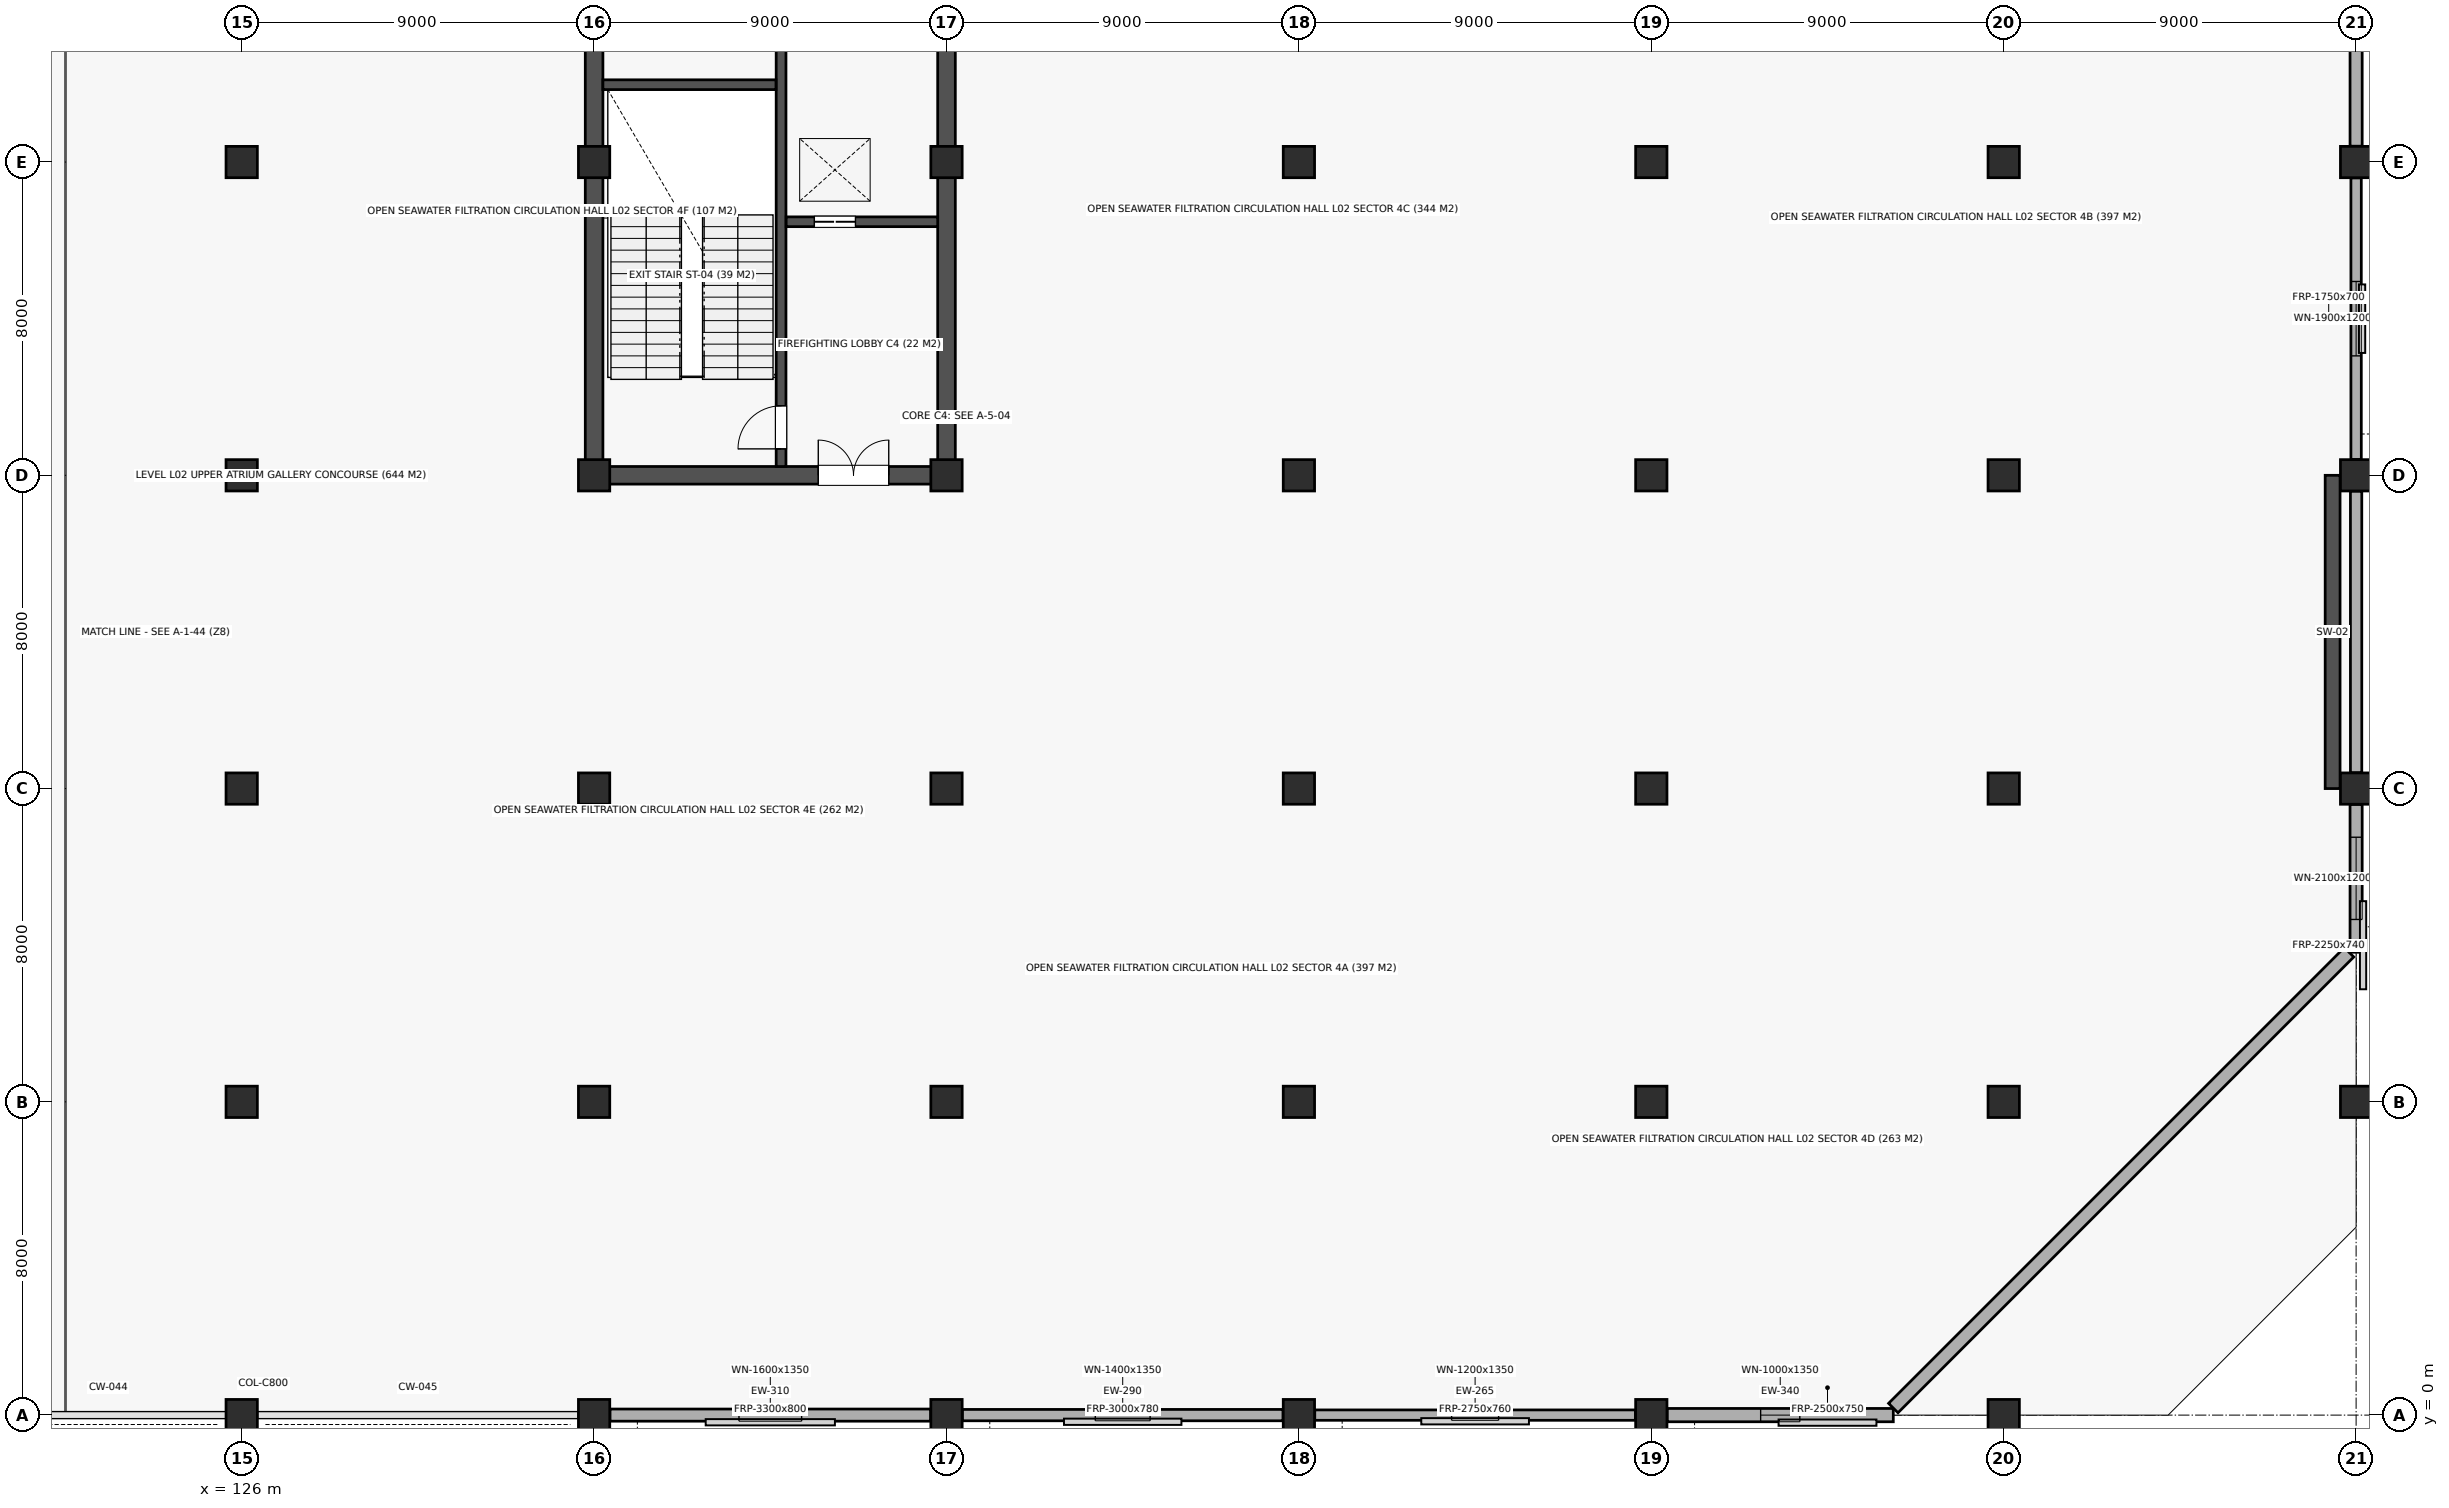
"""IFC4 building model, lengths in metres.
Left out: names, types, materials, properties, quantities, classifications, styles, units other than length and angle.
Written with IfcOpenShell. Run it as: python <this file> out.ifc"""

import sys

from ifc_helpers import new_model, si_unit, direction, frame, frame_2d, origin, origin_2d, place, context, subcontext, project, spatial, rectangle, extrude, element, fill, save


model = new_model("IFC4")
c1 = context("Model", 3, precision=1e-05, world=origin(), true_north=direction((0.0, 1.0)))
c2 = subcontext(c1, "Body", "Model", "MODEL_VIEW")
j1 = project(units=[si_unit("LENGTHUNIT", "METRE"), si_unit("PLANEANGLEUNIT", "RADIAN")], contexts=[c1])
p1 = place(None, origin())
s1 = spatial("IfcSite", under=j1, at=p1, CompositionType="ELEMENT")
p2 = place(p1, origin())
s2 = spatial("IfcBuilding", under=s1, at=p2, CompositionType="ELEMENT")
p3 = place(p2, frame((0.0, 0.0, 9.0)))
s3 = spatial("IfcBuildingStorey", under=s2, at=p3, CompositionType="ELEMENT", Elevation=9.0)
for number, where, z_axis, x_axis in (
    (1, (126.0, 0.0, 0.0), (0.0, 0.0, 1.0), (1.0, 0.0, 0.0)),
    (2, (126.0, 8.0, 0.0), (0.0, 0.0, 1.0), (1.0, 0.0, 0.0)),
    (3, (126.0, 16.0, 0.0), (0.0, 0.0, 1.0), (1.0, 0.0, 0.0)),
    (4, (126.0, 24.0, 0.0), (0.0, 0.0, 1.0), (1.0, 0.0, 0.0)),
    (5, (126.0, 32.0, 0.0), (0.0, 0.0, 1.0), (1.0, 0.0, 0.0)),
    (6, (135.0, 0.0, 0.0), (0.0, 0.0, 1.0), (1.0, 0.0, 0.0)),
    (7, (135.0, 8.0, 0.0), (0.0, 0.0, 1.0), (1.0, 0.0, 0.0)),
    (8, (135.0, 16.0, 0.0), (0.0, 0.0, 1.0), (1.0, 0.0, 0.0)),
    (9, (135.0, 24.0, 0.0), (0.0, 0.0, 1.0), (1.0, 0.0, 0.0)),
    (10, (135.0, 32.0, 0.0), (0.0, 0.0, 1.0), (1.0, 0.0, 0.0)),
    (11, (144.0, 0.0, 0.0), (0.0, 0.0, 1.0), (1.0, 0.0, 0.0)),
    (12, (144.0, 8.0, 0.0), (0.0, 0.0, 1.0), (1.0, 0.0, 0.0)),
    (13, (144.0, 16.0, 0.0), (0.0, 0.0, 1.0), (1.0, 0.0, 0.0)),
    (14, (144.0, 24.0, 0.0), (0.0, 0.0, 1.0), (1.0, 0.0, 0.0)),
    (15, (144.0, 32.0, 0.0), (0.0, 0.0, 1.0), (1.0, 0.0, 0.0)),
    (16, (153.0, 0.0, 0.0), (0.0, 0.0, 1.0), (1.0, 0.0, 0.0)),
    (17, (153.0, 8.0, 0.0), (0.0, 0.0, 1.0), (1.0, 0.0, 0.0)),
    (18, (153.0, 16.0, 0.0), (0.0, 0.0, 1.0), (1.0, 0.0, 0.0)),
    (19, (153.0, 24.0, 0.0), (0.0, 0.0, 1.0), (1.0, 0.0, 0.0)),
    (20, (153.0, 32.0, 0.0), (0.0, 0.0, 1.0), (1.0, 0.0, 0.0)),
    (21, (162.0, 0.0, 0.0), (0.0, 0.0, 1.0), (1.0, 0.0, 0.0)),
    (22, (162.0, 8.0, 0.0), (0.0, 0.0, 1.0), (1.0, 0.0, 0.0)),
    (23, (162.0, 16.0, 0.0), (0.0, 0.0, 1.0), (1.0, 0.0, 0.0)),
    (24, (162.0, 24.0, 0.0), (0.0, 0.0, 1.0), (1.0, 0.0, 0.0)),
    (25, (162.0, 32.0, 0.0), (0.0, 0.0, 1.0), (1.0, 0.0, 0.0)),
    (26, (171.0, 0.0, 0.0), (0.0, 0.0, 1.0), (1.0, 0.0, 0.0)),
    (27, (171.0, 8.0, 0.0), (0.0, 0.0, 1.0), (1.0, 0.0, 0.0)),
    (28, (171.0, 16.0, 0.0), (0.0, 0.0, 1.0), (1.0, 0.0, 0.0)),
    (29, (171.0, 24.0, 0.0), (0.0, 0.0, 1.0), (1.0, 0.0, 0.0)),
    (30, (171.0, 32.0, 0.0), (0.0, 0.0, 1.0), (1.0, 0.0, 0.0)),
    (31, (180.0, 8.0, 0.0), (0.0, 0.0, 1.0), (1.0, 0.0, 0.0)),
    (32, (180.0, 16.0, 0.0), (0.0, 0.0, 1.0), (1.0, 0.0, 0.0)),
    (33, (180.0, 24.0, 0.0), (0.0, 0.0, 1.0), (1.0, 0.0, 0.0)),
    (34, (180.0, 32.0, 0.0), (0.0, 0.0, 1.0), (1.0, 0.0, 0.0)),
):
    element("IfcColumn", number, at=place(p3, frame(where, z_axis=z_axis, x_axis=x_axis)), inside=s3, PredefinedType="COLUMN", context=c2, shape_type="SweptSolid", body=[
        extrude(rectangle(XDim=0.8, YDim=0.8, at=origin_2d()), origin(), (0.0, 0.0, 1.0), 4.5),
    ])
p4 = place(p3, frame((179.4, 16.0, 0.0), z_axis=(0.0, 0.0, 1.0), x_axis=(0.0, 1.0, 0.0)))
e35 = element("IfcWall", 35, at=p4, inside=s3, PredefinedType="SHEAR", context=c2, shape_type="SweptSolid", body=[
    extrude(rectangle(XDim=8.0, YDim=0.38, at=frame_2d((4.0, 0.0))), origin(), (0.0, 0.0, 1.0), 4.14),
])
p5 = place(p3, frame((135.225, 24.0, 0.0), z_axis=(0.0, 0.0, 1.0), x_axis=(1.0, 0.0, 0.0)))
e36 = element("IfcWall", 36, at=p5, inside=s3, PredefinedType="SHEAR", context=c2, shape_type="SweptSolid", body=[
    extrude(rectangle(XDim=8.55, YDim=0.45, at=frame_2d((4.275, 0.0))), origin(), (0.0, 0.0, 1.0), 4.14),
])
p6 = place(p5, frame((5.5, 0.0, 0.0)))
e37 = element("IfcOpeningElement", 37, at=p6, cuts=e36, PredefinedType="OPENING", context=c2, shape_type="SweptSolid", body=[
    extrude(rectangle(XDim=1.8, YDim=2.18, at=frame_2d((0.9, 1.09))), frame((0.0, 0.237, 0.0), z_axis=(0.0, -1.0, 0.0), x_axis=(1.0, 0.0, 0.0)), (0.0, 0.0, 1.0), 0.474),
])
p7 = place(p3, frame((135.0, 24.225, 0.0), z_axis=(0.0, 0.0, 1.0), x_axis=(0.0, 1.0, 0.0)))
e38 = element("IfcWall", 38, at=p7, inside=s3, PredefinedType="SHEAR", context=c2, shape_type="SweptSolid", body=[
    extrude(rectangle(XDim=15.55, YDim=0.45, at=frame_2d((7.775, 0.0))), origin(), (0.0, 0.0, 1.0), 4.14),
])
p8 = place(p7, frame((11.2, 0.0, 0.0)))
e39 = element("IfcOpeningElement", 39, at=p8, cuts=e38, PredefinedType="OPENING", context=c2, shape_type="SweptSolid", body=[
    extrude(rectangle(XDim=0.95, YDim=2.1, at=frame_2d((0.475, 1.05))), frame((0.0, 0.237, 0.0), z_axis=(0.0, -1.0, 0.0), x_axis=(1.0, 0.0, 0.0)), (0.0, 0.0, 1.0), 0.474),
])
p9 = place(p3, frame((144.0, 24.225, 0.0), z_axis=(0.0, 0.0, 1.0), x_axis=(0.0, 1.0, 0.0)))
e40 = element("IfcWall", 40, at=p9, inside=s3, PredefinedType="SHEAR", context=c2, shape_type="SweptSolid", body=[
    extrude(rectangle(XDim=15.55, YDim=0.45, at=frame_2d((7.775, 0.0))), origin(), (0.0, 0.0, 1.0), 4.14),
])
p10 = place(p3, frame((139.775, 24.225, 0.0), z_axis=(0.0, 0.0, 1.0), x_axis=(0.0, 1.0, 0.0)))
e41 = element("IfcWall", 41, at=p10, inside=s3, PredefinedType="SOLIDWALL", context=c2, shape_type="SweptSolid", body=[
    extrude(rectangle(XDim=15.55, YDim=0.25, at=frame_2d((7.775, 0.0))), origin(), (0.0, 0.0, 1.0), 4.14),
])
p11 = place(p10, frame((0.45, 0.0, 0.0)))
e42 = element("IfcOpeningElement", 42, at=p11, cuts=e41, PredefinedType="OPENING", context=c2, shape_type="SweptSolid", body=[
    extrude(rectangle(XDim=1.1, YDim=2.15, at=frame_2d((0.55, 1.075))), frame((0.0, 0.137, 0.0), z_axis=(0.0, -1.0, 0.0), x_axis=(1.0, 0.0, 0.0)), (0.0, 0.0, 1.0), 0.274),
])
p12 = place(p3, frame((135.225, 33.975, 0.0), z_axis=(0.0, 0.0, 1.0), x_axis=(1.0, 0.0, 0.0)))
e43 = element("IfcWall", 43, at=p12, inside=s3, PredefinedType="SOLIDWALL", context=c2, shape_type="SweptSolid", body=[
    extrude(rectangle(XDim=4.42, YDim=0.25, at=frame_2d((2.21, 0.0))), origin(), (0.0, 0.0, 1.0), 4.14),
])
p13 = place(p3, frame((139.905, 30.475, 0.0), z_axis=(0.0, 0.0, 1.0), x_axis=(1.0, 0.0, 0.0)))
e44 = element("IfcWall", 44, at=p13, inside=s3, PredefinedType="SOLIDWALL", context=c2, shape_type="SweptSolid", body=[
    extrude(rectangle(XDim=3.87, YDim=0.25, at=frame_2d((1.935, 0.0))), origin(), (0.0, 0.0, 1.0), 4.14),
])
p14 = place(p13, frame((0.72, 0.0, 0.0)))
e45 = element("IfcOpeningElement", 45, at=p14, cuts=e44, PredefinedType="OPENING", context=c2, shape_type="SweptSolid", body=[
    extrude(rectangle(XDim=1.05, YDim=2.12, at=frame_2d((0.525, 1.06))), frame((0.0, 0.137, 0.0), z_axis=(0.0, -1.0, 0.0), x_axis=(1.0, 0.0, 0.0)), (0.0, 0.0, 1.0), 0.274),
])
p15 = place(p3, frame((135.405, 0.0, 0.0), z_axis=(0.0, 0.0, 1.0), x_axis=(1.0, 0.0, 0.0)))
e46 = element("IfcWall", 46, at=p15, inside=s3, PredefinedType="STANDARD", context=c2, shape_type="SweptSolid", body=[
    extrude(rectangle(XDim=8.19, YDim=0.31, at=frame_2d((4.095, 0.0))), origin(), (0.0, 0.0, 1.0), 3.42),
])
p16 = place(p15, frame((3.295, 0.0, 0.85)))
e47 = element("IfcOpeningElement", 47, at=p16, cuts=e46, PredefinedType="OPENING", context=c2, shape_type="SweptSolid", body=[
    extrude(rectangle(XDim=1.6, YDim=1.35, at=frame_2d((0.8, 0.675))), frame((0.0, 0.167, 0.0), z_axis=(0.0, -1.0, 0.0), x_axis=(1.0, 0.0, 0.0)), (0.0, 0.0, 1.0), 0.334),
])
p17 = place(p3, frame((144.405, 0.0, 0.0), z_axis=(0.0, 0.0, 1.0), x_axis=(1.0, 0.0, 0.0)))
e48 = element("IfcWall", 48, at=p17, inside=s3, PredefinedType="STANDARD", context=c2, shape_type="SweptSolid", body=[
    extrude(rectangle(XDim=8.19, YDim=0.29, at=frame_2d((4.095, 0.0))), origin(), (0.0, 0.0, 1.0), 3.42),
])
p18 = place(p17, frame((3.395, 0.0, 0.85)))
e49 = element("IfcOpeningElement", 49, at=p18, cuts=e48, PredefinedType="OPENING", context=c2, shape_type="SweptSolid", body=[
    extrude(rectangle(XDim=1.4, YDim=1.35, at=frame_2d((0.7, 0.675))), frame((0.0, 0.157, 0.0), z_axis=(0.0, -1.0, 0.0), x_axis=(1.0, 0.0, 0.0)), (0.0, 0.0, 1.0), 0.314),
])
p19 = place(p3, frame((153.405, 0.0, 0.0), z_axis=(0.0, 0.0, 1.0), x_axis=(1.0, 0.0, 0.0)))
e50 = element("IfcWall", 50, at=p19, inside=s3, PredefinedType="STANDARD", context=c2, shape_type="SweptSolid", body=[
    extrude(rectangle(XDim=8.19, YDim=0.265, at=frame_2d((4.095, 0.0))), origin(), (0.0, 0.0, 1.0), 3.42),
])
p20 = place(p19, frame((3.495, 0.0, 0.85)))
e51 = element("IfcOpeningElement", 51, at=p20, cuts=e50, PredefinedType="OPENING", context=c2, shape_type="SweptSolid", body=[
    extrude(rectangle(XDim=1.2, YDim=1.35, at=frame_2d((0.6, 0.675))), frame((0.0, 0.145, 0.0), z_axis=(0.0, -1.0, 0.0), x_axis=(1.0, 0.0, 0.0)), (0.0, 0.0, 1.0), 0.289),
])
p21 = place(p3, frame((162.405, 0.0, 0.0), z_axis=(0.0, 0.0, 1.0), x_axis=(1.0, 0.0, 0.0)))
e52 = element("IfcWall", 52, at=p21, inside=s3, PredefinedType="STANDARD", context=c2, shape_type="SweptSolid", body=[
    extrude(rectangle(XDim=5.775, YDim=0.34, at=frame_2d((2.887, 0.0))), origin(), (0.0, 0.0, 1.0), 3.42),
])
p22 = place(p21, frame((2.387, 0.0, 0.85)))
e53 = element("IfcOpeningElement", 53, at=p22, cuts=e52, PredefinedType="OPENING", context=c2, shape_type="SweptSolid", body=[
    extrude(rectangle(XDim=1.0, YDim=1.35, at=frame_2d((0.5, 0.675))), frame((0.0, 0.182, 0.0), z_axis=(0.0, -1.0, 0.0), x_axis=(1.0, 0.0, 0.0)), (0.0, 0.0, 1.0), 0.364),
])
p23 = place(p3, frame((168.18, 0.18, 0.0), z_axis=(0.0, 0.0, 1.0), x_axis=(0.707106781187, 0.707106781187, 0.0)))
e54 = element("IfcWall", 54, at=p23, inside=s3, PredefinedType="STANDARD", context=c2, shape_type="SweptSolid", body=[
    extrude(rectangle(XDim=16.462, YDim=0.34, at=frame_2d((8.231, 0.0))), origin(), (0.0, 0.0, 1.0), 3.42),
])
p24 = place(p3, frame((180.0, 11.82, 0.0), z_axis=(0.0, 0.0, 1.0), x_axis=(0.0, 1.0, 0.0)))
e55 = element("IfcWall", 55, at=p24, inside=s3, PredefinedType="STANDARD", context=c2, shape_type="SweptSolid", body=[
    extrude(rectangle(XDim=3.775, YDim=0.31, at=frame_2d((1.887, 0.0))), origin(), (0.0, 0.0, 1.0), 3.42),
])
p25 = place(p24, frame((0.837, 0.0, 0.85)))
e56 = element("IfcOpeningElement", 56, at=p25, cuts=e55, PredefinedType="OPENING", context=c2, shape_type="SweptSolid", body=[
    extrude(rectangle(XDim=2.1, YDim=1.2, at=frame_2d((1.05, 0.6))), frame((0.0, 0.167, 0.0), z_axis=(0.0, -1.0, 0.0), x_axis=(1.0, 0.0, 0.0)), (0.0, 0.0, 1.0), 0.334),
])
p26 = place(p3, frame((180.0, 16.405, 0.0), z_axis=(0.0, 0.0, 1.0), x_axis=(0.0, 1.0, 0.0)))
e57 = element("IfcWall", 57, at=p26, inside=s3, PredefinedType="STANDARD", context=c2, shape_type="SweptSolid", body=[
    extrude(rectangle(XDim=7.19, YDim=0.29, at=frame_2d((3.595, 0.0))), origin(), (0.0, 0.0, 1.0), 3.42),
])
p27 = place(p3, frame((180.0, 24.405, 0.0), z_axis=(0.0, 0.0, 1.0), x_axis=(0.0, 1.0, 0.0)))
e58 = element("IfcWall", 58, at=p27, inside=s3, PredefinedType="STANDARD", context=c2, shape_type="SweptSolid", body=[
    extrude(rectangle(XDim=7.19, YDim=0.265, at=frame_2d((3.595, 0.0))), origin(), (0.0, 0.0, 1.0), 3.42),
])
p28 = place(p27, frame((2.645, 0.0, 0.85)))
e59 = element("IfcOpeningElement", 59, at=p28, cuts=e58, PredefinedType="OPENING", context=c2, shape_type="SweptSolid", body=[
    extrude(rectangle(XDim=1.9, YDim=1.2, at=frame_2d((0.95, 0.6))), frame((0.0, 0.145, 0.0), z_axis=(0.0, -1.0, 0.0), x_axis=(1.0, 0.0, 0.0)), (0.0, 0.0, 1.0), 0.289),
])
p29 = place(p3, frame((180.0, 32.405, 0.0), z_axis=(0.0, 0.0, 1.0), x_axis=(0.0, 1.0, 0.0)))
e60 = element("IfcWall", 60, at=p29, inside=s3, PredefinedType="STANDARD", context=c2, shape_type="SweptSolid", body=[
    extrude(rectangle(XDim=7.19, YDim=0.31, at=frame_2d((3.595, 0.0))), origin(), (0.0, 0.0, 1.0), 3.42),
])
p30 = place(p29, frame((2.745, 0.0, 0.85)))
e61 = element("IfcOpeningElement", 61, at=p30, cuts=e60, PredefinedType="OPENING", context=c2, shape_type="SweptSolid", body=[
    extrude(rectangle(XDim=1.7, YDim=1.2, at=frame_2d((0.85, 0.6))), frame((0.0, 0.167, 0.0), z_axis=(0.0, -1.0, 0.0), x_axis=(1.0, 0.0, 0.0)), (0.0, 0.0, 1.0), 0.334),
])
p31 = place(p6, origin())
e62 = element("IfcDoor", 62, at=p31, inside=s3, OperationType="DOUBLE_DOOR_SINGLE_SWING", PredefinedType="DOOR", context=c2, shape_type="SweptSolid", body=[
    extrude(rectangle(XDim=1.8, YDim=2.18, at=frame_2d((0.9, 1.09))), frame((0.0, 0.025, 0.0), z_axis=(0.0, -1.0, 0.0), x_axis=(1.0, 0.0, 0.0)), (0.0, 0.0, 1.0), 0.05),
])
fill(e37, e62)
p32 = place(p11, origin())
e63 = element("IfcDoor", 63, at=p32, inside=s3, OperationType="SINGLE_SWING_LEFT", PredefinedType="DOOR", context=c2, shape_type="SweptSolid", body=[
    extrude(rectangle(XDim=1.1, YDim=2.15, at=frame_2d((0.55, 1.075))), frame((0.0, 0.025, 0.0), z_axis=(0.0, -1.0, 0.0), x_axis=(1.0, 0.0, 0.0)), (0.0, 0.0, 1.0), 0.05),
])
fill(e42, e63)
p33 = place(p14, origin())
e64 = element("IfcDoor", 64, at=p33, inside=s3, OperationType="DOUBLE_DOOR_SLIDING", PredefinedType="DOOR", context=c2, shape_type="SweptSolid", body=[
    extrude(rectangle(XDim=1.05, YDim=2.12, at=frame_2d((0.525, 1.06))), frame((0.0, 0.025, 0.0), z_axis=(0.0, -1.0, 0.0), x_axis=(1.0, 0.0, 0.0)), (0.0, 0.0, 1.0), 0.05),
])
fill(e45, e64)
p34 = place(p16, origin())
e65 = element("IfcWindow", 65, at=p34, inside=s3, PartitioningType="SINGLE_PANEL", PredefinedType="WINDOW", context=c2, shape_type="SweptSolid", body=[
    extrude(rectangle(XDim=1.6, YDim=1.35, at=frame_2d((0.8, 0.675))), frame((0.0, 0.03, 0.0), z_axis=(0.0, -1.0, 0.0), x_axis=(1.0, 0.0, 0.0)), (0.0, 0.0, 1.0), 0.06),
])
fill(e47, e65)
p35 = place(p18, origin())
e66 = element("IfcWindow", 66, at=p35, inside=s3, PartitioningType="SINGLE_PANEL", PredefinedType="WINDOW", context=c2, shape_type="SweptSolid", body=[
    extrude(rectangle(XDim=1.4, YDim=1.35, at=frame_2d((0.7, 0.675))), frame((0.0, 0.03, 0.0), z_axis=(0.0, -1.0, 0.0), x_axis=(1.0, 0.0, 0.0)), (0.0, 0.0, 1.0), 0.06),
])
fill(e49, e66)
p36 = place(p20, origin())
e67 = element("IfcWindow", 67, at=p36, inside=s3, PartitioningType="SINGLE_PANEL", PredefinedType="WINDOW", context=c2, shape_type="SweptSolid", body=[
    extrude(rectangle(XDim=1.2, YDim=1.35, at=frame_2d((0.6, 0.675))), frame((0.0, 0.03, 0.0), z_axis=(0.0, -1.0, 0.0), x_axis=(1.0, 0.0, 0.0)), (0.0, 0.0, 1.0), 0.06),
])
fill(e51, e67)
p37 = place(p22, origin())
e68 = element("IfcWindow", 68, at=p37, inside=s3, PartitioningType="SINGLE_PANEL", PredefinedType="WINDOW", context=c2, shape_type="SweptSolid", body=[
    extrude(rectangle(XDim=1.0, YDim=1.35, at=frame_2d((0.5, 0.675))), frame((0.0, 0.03, 0.0), z_axis=(0.0, -1.0, 0.0), x_axis=(1.0, 0.0, 0.0)), (0.0, 0.0, 1.0), 0.06),
])
fill(e53, e68)
p38 = place(p25, origin())
e69 = element("IfcWindow", 69, at=p38, inside=s3, PartitioningType="SINGLE_PANEL", PredefinedType="WINDOW", context=c2, shape_type="SweptSolid", body=[
    extrude(rectangle(XDim=2.1, YDim=1.2, at=frame_2d((1.05, 0.6))), frame((0.0, 0.03, 0.0), z_axis=(0.0, -1.0, 0.0), x_axis=(1.0, 0.0, 0.0)), (0.0, 0.0, 1.0), 0.06),
])
fill(e56, e69)
p39 = place(p28, origin())
e70 = element("IfcWindow", 70, at=p39, inside=s3, PartitioningType="SINGLE_PANEL", PredefinedType="WINDOW", context=c2, shape_type="SweptSolid", body=[
    extrude(rectangle(XDim=1.9, YDim=1.2, at=frame_2d((0.95, 0.6))), frame((0.0, 0.03, 0.0), z_axis=(0.0, -1.0, 0.0), x_axis=(1.0, 0.0, 0.0)), (0.0, 0.0, 1.0), 0.06),
])
fill(e59, e70)
save(model, sys.argv[1])
